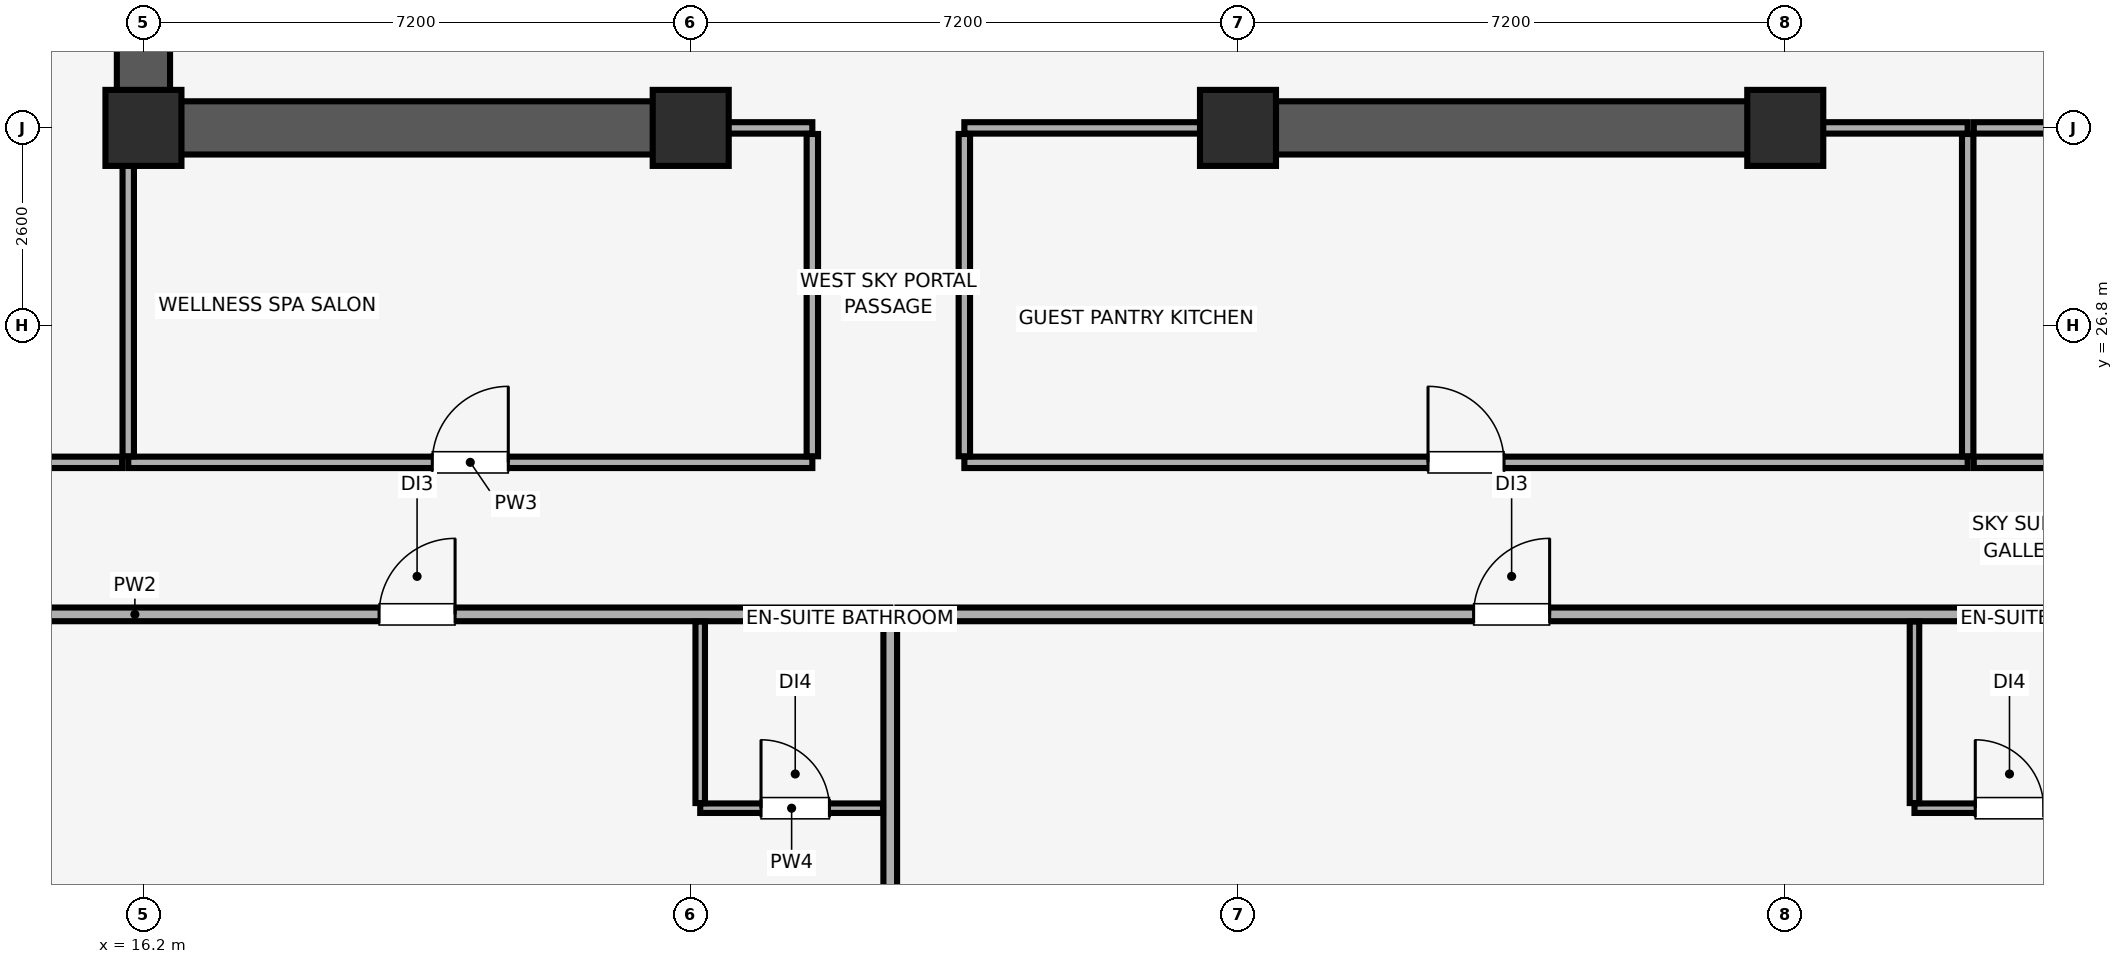
"""IFC4 building model, lengths in metres.
Left out: names, types, materials, properties, quantities, classifications, styles, units other than length and angle.
Written with IfcOpenShell. Run it as: python <this file> out.ifc"""

import sys

from ifc_helpers import new_model, si_unit, direction, frame, frame_2d, origin, origin_2d, place, context, subcontext, project, spatial, rectangle, extrude, element, fill, save


model = new_model("IFC4")
c1 = context("Model", 3, precision=1e-05, world=origin(), true_north=direction((0.0, 1.0)))
c2 = subcontext(c1, "Body", "Model", "MODEL_VIEW")
j1 = project(units=[si_unit("LENGTHUNIT", "METRE"), si_unit("PLANEANGLEUNIT", "RADIAN")], contexts=[c1])
p1 = place(None, origin())
s1 = spatial("IfcSite", under=j1, at=p1, CompositionType="ELEMENT")
p2 = place(p1, origin())
s2 = spatial("IfcBuilding", under=s1, at=p2, CompositionType="ELEMENT")
p3 = place(p2, frame((0.0, 0.0, 276.55)))
s3 = spatial("IfcBuildingStorey", under=s2, at=p3, CompositionType="ELEMENT", Elevation=276.55)
for number, where, z_axis, x_axis in (
    (1, (16.2, 29.4, 0.0), (0.0, 0.0, 1.0), (1.0, 0.0, 0.0)),
    (2, (23.4, 29.4, 0.0), (0.0, 0.0, 1.0), (1.0, 0.0, 0.0)),
    (3, (30.6, 29.4, 0.0), (0.0, 0.0, 1.0), (1.0, 0.0, 0.0)),
    (4, (37.8, 29.4, 0.0), (0.0, 0.0, 1.0), (1.0, 0.0, 0.0)),
):
    element("IfcColumn", number, at=place(p3, frame(where, z_axis=z_axis, x_axis=x_axis)), inside=s3, PredefinedType="COLUMN", context=c2, shape_type="SweptSolid", body=[
        extrude(rectangle(XDim=1.0, YDim=1.0, at=origin_2d()), origin(), (0.0, 0.0, 1.0), 3.6),
    ])
p4 = place(p3, frame((16.2, 29.4, 0.0), z_axis=(0.0, 0.0, 1.0), x_axis=(0.0, 1.0, 0.0)))
e5 = element("IfcWall", 5, at=p4, inside=s3, PredefinedType="SHEAR", context=c2, shape_type="SweptSolid", body=[
    extrude(rectangle(XDim=19.2, YDim=0.7, at=frame_2d((9.6, 0.0))), origin(), (0.0, 0.0, 1.0), 3.6),
])
p5 = place(p3, frame((16.555, 29.4, 0.0), z_axis=(0.0, 0.0, 1.0), x_axis=(1.0, 0.0, 0.0)))
e6 = element("IfcWall", 6, at=p5, inside=s3, PredefinedType="SHEAR", context=c2, shape_type="SweptSolid", body=[
    extrude(rectangle(XDim=7.045, YDim=0.7, at=frame_2d((3.522, 0.0))), origin(), (0.0, 0.0, 1.0), 3.6),
])
p6 = place(p3, frame((30.4, 29.4, 0.0), z_axis=(0.0, 0.0, 1.0), x_axis=(1.0, 0.0, 0.0)))
e7 = element("IfcWall", 7, at=p6, inside=s3, PredefinedType="SHEAR", context=c2, shape_type="SweptSolid", body=[
    extrude(rectangle(XDim=7.6, YDim=0.7, at=frame_2d((3.8, 0.0))), origin(), (0.0, 0.0, 1.0), 3.6),
])
p7 = place(p3, frame((6.15, 23.0, 0.0), z_axis=(0.0, 0.0, 1.0), x_axis=(1.0, 0.0, 0.0)))
e8 = element("IfcWall", 8, at=p7, inside=s3, PredefinedType="PARTITIONING", context=c2, shape_type="SweptSolid", body=[
    extrude(rectangle(XDim=19.875, YDim=0.18, at=frame_2d((9.938, 0.0))), origin(), (0.0, 0.0, 1.0), 3.6),
])
p8 = place(p7, frame((13.15, 0.0, 0.0)))
e9 = element("IfcOpeningElement", 9, at=p8, cuts=e8, PredefinedType="OPENING", context=c2, shape_type="SweptSolid", body=[
    extrude(rectangle(XDim=1.0, YDim=2.15, at=frame_2d((0.5, 1.075))), frame((0.0, 0.1, 0.0), z_axis=(0.0, -1.0, 0.0), x_axis=(1.0, 0.0, 0.0)), (0.0, 0.0, 1.0), 0.2),
])
p9 = place(p3, frame((26.025, 6.15, 0.0), z_axis=(0.0, 0.0, 1.0), x_axis=(0.0, 1.0, 0.0)))
e10 = element("IfcWall", 10, at=p9, inside=s3, PredefinedType="PARTITIONING", context=c2, shape_type="SweptSolid", body=[
    extrude(rectangle(XDim=16.755, YDim=0.18, at=frame_2d((8.377, 0.0))), origin(), (0.0, 0.0, 1.0), 3.6),
])
p10 = place(p3, frame((23.525, 20.45, 0.0), z_axis=(0.0, 0.0, 1.0), x_axis=(1.0, 0.0, 0.0)))
e11 = element("IfcWall", 11, at=p10, inside=s3, PredefinedType="PARTITIONING", context=c2, shape_type="SweptSolid", body=[
    extrude(rectangle(XDim=2.405, YDim=0.125, at=frame_2d((1.203, 0.0))), origin(), (0.0, 0.0, 1.0), 3.6),
])
p11 = place(p10, frame((0.8, 0.0, 0.0)))
e12 = element("IfcOpeningElement", 12, at=p11, cuts=e11, PredefinedType="OPENING", context=c2, shape_type="SweptSolid", body=[
    extrude(rectangle(XDim=0.9, YDim=2.1, at=frame_2d((0.45, 1.05))), frame((0.0, 0.073, 0.0), z_axis=(0.0, -1.0, 0.0), x_axis=(1.0, 0.0, 0.0)), (0.0, 0.0, 1.0), 0.145),
])
p12 = place(p3, frame((23.525, 20.518, 0.0), z_axis=(0.0, 0.0, 1.0), x_axis=(0.0, 1.0, 0.0)))
e13 = element("IfcWall", 13, at=p12, inside=s3, PredefinedType="PARTITIONING", context=c2, shape_type="SweptSolid", body=[
    extrude(rectangle(XDim=2.387, YDim=0.125, at=frame_2d((1.194, 0.0))), origin(), (0.0, 0.0, 1.0), 3.1),
])
p13 = place(p3, frame((26.12, 23.0, 0.0), z_axis=(0.0, 0.0, 1.0), x_axis=(1.0, 0.0, 0.0)))
e14 = element("IfcWall", 14, at=p13, inside=s3, PredefinedType="PARTITIONING", context=c2, shape_type="SweptSolid", body=[
    extrude(rectangle(XDim=15.88, YDim=0.18, at=frame_2d((7.94, 0.0))), origin(), (0.0, 0.0, 1.0), 3.6),
])
p14 = place(p13, frame((7.58, 0.0, 0.0)))
e15 = element("IfcOpeningElement", 15, at=p14, cuts=e14, PredefinedType="OPENING", context=c2, shape_type="SweptSolid", body=[
    extrude(rectangle(XDim=1.0, YDim=2.15, at=frame_2d((0.5, 1.075))), frame((0.0, 0.1, 0.0), z_axis=(0.0, -1.0, 0.0), x_axis=(1.0, 0.0, 0.0)), (0.0, 0.0, 1.0), 0.2),
])
p15 = place(p3, frame((39.5, 20.45, 0.0), z_axis=(0.0, 0.0, 1.0), x_axis=(1.0, 0.0, 0.0)))
e16 = element("IfcWall", 16, at=p15, inside=s3, PredefinedType="PARTITIONING", context=c2, shape_type="SweptSolid", body=[
    extrude(rectangle(XDim=2.405, YDim=0.125, at=frame_2d((1.203, 0.0))), origin(), (0.0, 0.0, 1.0), 3.6),
])
p16 = place(p15, frame((0.8, 0.0, 0.0)))
e17 = element("IfcOpeningElement", 17, at=p16, cuts=e16, PredefinedType="OPENING", context=c2, shape_type="SweptSolid", body=[
    extrude(rectangle(XDim=0.9, YDim=2.1, at=frame_2d((0.45, 1.05))), frame((0.0, 0.073, 0.0), z_axis=(0.0, -1.0, 0.0), x_axis=(1.0, 0.0, 0.0)), (0.0, 0.0, 1.0), 0.145),
])
p17 = place(p3, frame((39.5, 20.518, 0.0), z_axis=(0.0, 0.0, 1.0), x_axis=(0.0, 1.0, 0.0)))
e18 = element("IfcWall", 18, at=p17, inside=s3, PredefinedType="PARTITIONING", context=c2, shape_type="SweptSolid", body=[
    extrude(rectangle(XDim=2.387, YDim=0.125, at=frame_2d((1.194, 0.0))), origin(), (0.0, 0.0, 1.0), 3.6),
])
p18 = place(p3, frame((16.0, 25.0, 0.0), z_axis=(0.0, 0.0, 1.0), x_axis=(1.0, 0.0, 0.0)))
e19 = element("IfcWall", 19, at=p18, inside=s3, PredefinedType="PARTITIONING", context=c2, shape_type="SweptSolid", body=[
    extrude(rectangle(XDim=9.0, YDim=0.15, at=frame_2d((4.5, 0.0))), origin(), (0.0, 0.0, 1.0), 3.6),
])
p19 = place(p18, frame((4.0, 0.0, 0.0)))
e20 = element("IfcOpeningElement", 20, at=p19, cuts=e19, PredefinedType="OPENING", context=c2, shape_type="SweptSolid", body=[
    extrude(rectangle(XDim=1.0, YDim=2.15, at=frame_2d((0.5, 1.075))), frame((0.0, 0.085, 0.0), z_axis=(0.0, -1.0, 0.0), x_axis=(1.0, 0.0, 0.0)), (0.0, 0.0, 1.0), 0.17),
])
p20 = place(p3, frame((23.61, 29.4, 0.0), z_axis=(0.0, 0.0, 1.0), x_axis=(1.0, 0.0, 0.0)))
e21 = element("IfcWall", 21, at=p20, inside=s3, PredefinedType="PARTITIONING", context=c2, shape_type="SweptSolid", body=[
    extrude(rectangle(XDim=1.39, YDim=0.15, at=frame_2d((0.695, 0.0))), origin(), (0.0, 0.0, 1.0), 2.5),
])
p21 = place(p3, frame((16.0, 25.08, 0.0), z_axis=(0.0, 0.0, 1.0), x_axis=(0.0, 1.0, 0.0)))
e22 = element("IfcWall", 22, at=p21, inside=s3, PredefinedType="PARTITIONING", context=c2, shape_type="SweptSolid", body=[
    extrude(rectangle(XDim=4.31, YDim=0.15, at=frame_2d((2.155, 0.0))), origin(), (0.0, 0.0, 1.0), 3.1),
])
p22 = place(p3, frame((25.0, 25.08, 0.0), z_axis=(0.0, 0.0, 1.0), x_axis=(0.0, 1.0, 0.0)))
e23 = element("IfcWall", 23, at=p22, inside=s3, PredefinedType="PARTITIONING", context=c2, shape_type="SweptSolid", body=[
    extrude(rectangle(XDim=4.24, YDim=0.15, at=frame_2d((2.12, 0.0))), origin(), (0.0, 0.0, 1.0), 3.6),
])
p23 = place(p3, frame((27.0, 25.0, 0.0), z_axis=(0.0, 0.0, 1.0), x_axis=(1.0, 0.0, 0.0)))
e24 = element("IfcWall", 24, at=p23, inside=s3, PredefinedType="PARTITIONING", context=c2, shape_type="SweptSolid", body=[
    extrude(rectangle(XDim=13.2, YDim=0.15, at=frame_2d((6.6, 0.0))), origin(), (0.0, 0.0, 1.0), 3.6),
])
p24 = place(p23, frame((6.1, 0.0, 0.0)))
e25 = element("IfcOpeningElement", 25, at=p24, cuts=e24, PredefinedType="OPENING", context=c2, shape_type="SweptSolid", body=[
    extrude(rectangle(XDim=1.0, YDim=2.15, at=frame_2d((0.5, 1.075))), frame((0.0, 0.085, 0.0), z_axis=(0.0, -1.0, 0.0), x_axis=(1.0, 0.0, 0.0)), (0.0, 0.0, 1.0), 0.17),
])
p25 = place(p3, frame((27.0, 29.4, 0.0), z_axis=(0.0, 0.0, 1.0), x_axis=(1.0, 0.0, 0.0)))
e26 = element("IfcWall", 26, at=p25, inside=s3, PredefinedType="PARTITIONING", context=c2, shape_type="SweptSolid", body=[
    extrude(rectangle(XDim=3.39, YDim=0.15, at=frame_2d((1.695, 0.0))), origin(), (0.0, 0.0, 1.0), 2.5),
])
p26 = place(p3, frame((38.01, 29.4, 0.0), z_axis=(0.0, 0.0, 1.0), x_axis=(1.0, 0.0, 0.0)))
e27 = element("IfcWall", 27, at=p26, inside=s3, PredefinedType="PARTITIONING", context=c2, shape_type="SweptSolid", body=[
    extrude(rectangle(XDim=2.19, YDim=0.15, at=frame_2d((1.095, 0.0))), origin(), (0.0, 0.0, 1.0), 2.5),
])
p27 = place(p3, frame((27.0, 25.08, 0.0), z_axis=(0.0, 0.0, 1.0), x_axis=(0.0, 1.0, 0.0)))
e28 = element("IfcWall", 28, at=p27, inside=s3, PredefinedType="PARTITIONING", context=c2, shape_type="SweptSolid", body=[
    extrude(rectangle(XDim=4.24, YDim=0.15, at=frame_2d((2.12, 0.0))), origin(), (0.0, 0.0, 1.0), 3.1),
])
p28 = place(p3, frame((40.2, 25.08, 0.0), z_axis=(0.0, 0.0, 1.0), x_axis=(0.0, 1.0, 0.0)))
e29 = element("IfcWall", 29, at=p28, inside=s3, PredefinedType="PARTITIONING", context=c2, shape_type="SweptSolid", body=[
    extrude(rectangle(XDim=4.24, YDim=0.15, at=frame_2d((2.12, 0.0))), origin(), (0.0, 0.0, 1.0), 3.6),
])
p29 = place(p3, frame((40.28, 25.0, 0.0), z_axis=(0.0, 0.0, 1.0), x_axis=(1.0, 0.0, 0.0)))
e30 = element("IfcWall", 30, at=p29, inside=s3, PredefinedType="PARTITIONING", context=c2, shape_type="SweptSolid", body=[
    extrude(rectangle(XDim=16.72, YDim=0.15, at=frame_2d((8.36, 0.0))), origin(), (0.0, 0.0, 1.0), 3.6),
])
p30 = place(p29, frame((7.82, 0.0, 0.0)))
e31 = element("IfcOpeningElement", 31, at=p30, cuts=e30, PredefinedType="OPENING", context=c2, shape_type="SweptSolid", body=[
    extrude(rectangle(XDim=1.0, YDim=2.15, at=frame_2d((0.5, 1.075))), frame((0.0, 0.085, 0.0), z_axis=(0.0, -1.0, 0.0), x_axis=(1.0, 0.0, 0.0)), (0.0, 0.0, 1.0), 0.17),
])
p31 = place(p3, frame((40.28, 29.4, 0.0), z_axis=(0.0, 0.0, 1.0), x_axis=(1.0, 0.0, 0.0)))
e32 = element("IfcWall", 32, at=p31, inside=s3, PredefinedType="PARTITIONING", context=c2, shape_type="SweptSolid", body=[
    extrude(rectangle(XDim=5.71, YDim=0.15, at=frame_2d((2.855, 0.0))), origin(), (0.0, 0.0, 1.0), 2.5),
])
p32 = place(p3, frame((6.15, 25.0, 0.0), z_axis=(0.0, 0.0, 1.0), x_axis=(1.0, 0.0, 0.0)))
e33 = element("IfcWall", 33, at=p32, inside=s3, PredefinedType="PARTITIONING", context=c2, shape_type="SweptSolid", body=[
    extrude(rectangle(XDim=9.77, YDim=0.15, at=frame_2d((4.885, 0.0))), origin(), (0.0, 0.0, 1.0), 3.6),
])
p33 = place(p32, frame((6.13, 0.0, 0.0)))
e34 = element("IfcOpeningElement", 34, at=p33, cuts=e33, PredefinedType="OPENING", context=c2, shape_type="SweptSolid", body=[
    extrude(rectangle(XDim=1.5, YDim=2.25, at=frame_2d((0.75, 1.125))), frame((0.0, 0.085, 0.0), z_axis=(0.0, -1.0, 0.0), x_axis=(1.0, 0.0, 0.0)), (0.0, 0.0, 1.0), 0.17),
])
p34 = place(p8, origin())
e35 = element("IfcDoor", 35, at=p34, inside=s3, OperationType="SINGLE_SWING_RIGHT", PredefinedType="DOOR", context=c2, shape_type="SweptSolid", body=[
    extrude(rectangle(XDim=1.0, YDim=2.15, at=frame_2d((0.5, 1.075))), frame((0.0, 0.025, 0.0), z_axis=(0.0, -1.0, 0.0), x_axis=(1.0, 0.0, 0.0)), (0.0, 0.0, 1.0), 0.05),
])
fill(e9, e35)
p35 = place(p11, origin())
e36 = element("IfcDoor", 36, at=p35, inside=s3, OperationType="SINGLE_SWING_LEFT", PredefinedType="DOOR", context=c2, shape_type="SweptSolid", body=[
    extrude(rectangle(XDim=0.9, YDim=2.1, at=frame_2d((0.45, 1.05))), frame((0.0, 0.025, 0.0), z_axis=(0.0, -1.0, 0.0), x_axis=(1.0, 0.0, 0.0)), (0.0, 0.0, 1.0), 0.05),
])
fill(e12, e36)
p36 = place(p14, origin())
e37 = element("IfcDoor", 37, at=p36, inside=s3, OperationType="SINGLE_SWING_RIGHT", PredefinedType="DOOR", context=c2, shape_type="SweptSolid", body=[
    extrude(rectangle(XDim=1.0, YDim=2.15, at=frame_2d((0.5, 1.075))), frame((0.0, 0.025, 0.0), z_axis=(0.0, -1.0, 0.0), x_axis=(1.0, 0.0, 0.0)), (0.0, 0.0, 1.0), 0.05),
])
fill(e15, e37)
p37 = place(p16, origin())
e38 = element("IfcDoor", 38, at=p37, inside=s3, OperationType="SINGLE_SWING_LEFT", PredefinedType="DOOR", context=c2, shape_type="SweptSolid", body=[
    extrude(rectangle(XDim=0.9, YDim=2.1, at=frame_2d((0.45, 1.05))), frame((0.0, 0.025, 0.0), z_axis=(0.0, -1.0, 0.0), x_axis=(1.0, 0.0, 0.0)), (0.0, 0.0, 1.0), 0.05),
])
fill(e17, e38)
p38 = place(p19, origin())
e39 = element("IfcDoor", 39, at=p38, inside=s3, OperationType="SINGLE_SWING_RIGHT", PredefinedType="DOOR", context=c2, shape_type="SweptSolid", body=[
    extrude(rectangle(XDim=1.0, YDim=2.15, at=frame_2d((0.5, 1.075))), frame((0.0, 0.025, 0.0), z_axis=(0.0, -1.0, 0.0), x_axis=(1.0, 0.0, 0.0)), (0.0, 0.0, 1.0), 0.05),
])
fill(e20, e39)
p39 = place(p24, origin())
e40 = element("IfcDoor", 40, at=p39, inside=s3, OperationType="SINGLE_SWING_LEFT", PredefinedType="DOOR", context=c2, shape_type="SweptSolid", body=[
    extrude(rectangle(XDim=1.0, YDim=2.15, at=frame_2d((0.5, 1.075))), frame((0.0, 0.025, 0.0), z_axis=(0.0, -1.0, 0.0), x_axis=(1.0, 0.0, 0.0)), (0.0, 0.0, 1.0), 0.05),
])
fill(e25, e40)
save(model, sys.argv[1])
